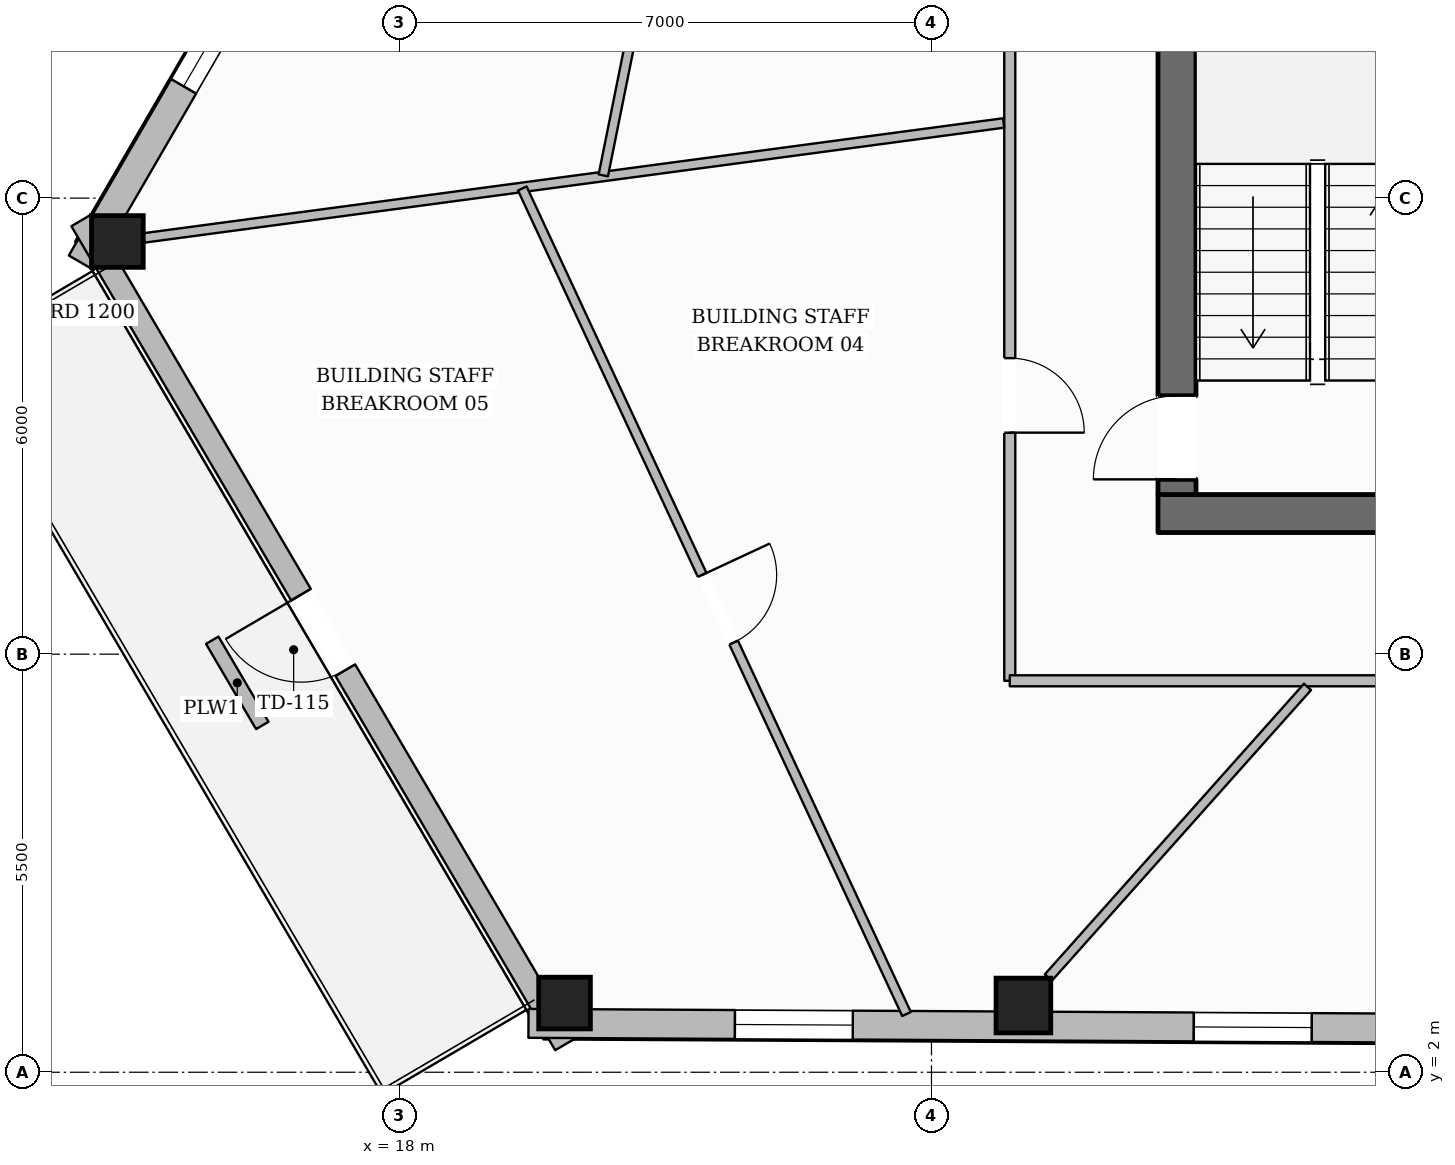
"""IFC4 building model, lengths in metres.
Left out: names, types, materials, properties, quantities, classifications, styles, units other than length and angle.
Written with IfcOpenShell. Run it as: python <this file> out.ifc"""

import sys

from ifc_helpers import new_model, si_unit, direction, frame, frame_2d, origin, origin_2d, place, context, subcontext, project, spatial, rectangle, hollow_rectangle, extrude, element, fill, save


model = new_model("IFC4")
c1 = context("Model", 3, precision=1e-05, world=origin(), true_north=direction((0.0, 1.0)))
c2 = subcontext(c1, "Body", "Model", "MODEL_VIEW")
j1 = project(units=[si_unit("LENGTHUNIT", "METRE"), si_unit("PLANEANGLEUNIT", "RADIAN")], contexts=[c1])
p1 = place(None, origin())
s1 = spatial("IfcSite", under=j1, at=p1, CompositionType="ELEMENT")
p2 = place(p1, origin())
s2 = spatial("IfcBuilding", under=s1, at=p2, CompositionType="ELEMENT")
p3 = place(p2, frame((0.0, 0.0, 124.0)))
s3 = spatial("IfcBuildingStorey", under=s2, at=p3, CompositionType="ELEMENT", Elevation=124.0)
p4 = place(p3, frame((27.98, 9.35, 0.0), z_axis=(0.0, 0.0, 1.0), x_axis=(1.0, 0.0, 0.0)))
e1 = element("IfcWall", 1, at=p4, inside=s3, PredefinedType="SOLIDWALL", context=c2, shape_type="SweptSolid", body=[
    extrude(rectangle(XDim=20.04, YDim=0.5, at=frame_2d((10.02, 0.0))), origin(), (0.0, 0.0, 1.0), 3.6),
])
p5 = place(p4, frame((10.52, 0.0, 0.0)))
e2 = element("IfcOpeningElement", 2, at=p5, cuts=e1, PredefinedType="OPENING", context=c2, shape_type="SweptSolid", body=[
    extrude(rectangle(XDim=1.4, YDim=2.2, at=frame_2d((0.7, 1.1))), frame((0.0, 0.26, 0.0), z_axis=(0.0, -1.0, 0.0), x_axis=(1.0, 0.0, 0.0)), (0.0, 0.0, 1.0), 0.52),
])
p6 = place(p3, frame((28.23, 9.6, 0.0), z_axis=(0.0, 0.0, 1.0), x_axis=(0.0, 1.0, 0.0)))
e3 = element("IfcWall", 3, at=p6, inside=s3, PredefinedType="SOLIDWALL", context=c2, shape_type="SweptSolid", body=[
    extrude(rectangle(XDim=13.0, YDim=0.5, at=frame_2d((6.5, 0.0))), origin(), (0.0, 0.0, 1.0), 3.6),
])
p7 = place(p6, frame((0.2, 0.0, 0.0)))
e4 = element("IfcOpeningElement", 4, at=p7, cuts=e3, PredefinedType="OPENING", context=c2, shape_type="SweptSolid", body=[
    extrude(rectangle(XDim=1.1, YDim=2.15, at=frame_2d((0.55, 1.075))), frame((0.0, 0.26, 0.0), z_axis=(0.0, -1.0, 0.0), x_axis=(1.0, 0.0, 0.0)), (0.0, 0.0, 1.0), 0.52),
])
p8 = place(p6, frame((8.4, 0.0, 0.0)))
e5 = element("IfcOpeningElement", 5, at=p8, cuts=e3, PredefinedType="OPENING", context=c2, shape_type="SweptSolid", body=[
    extrude(rectangle(XDim=0.9, YDim=2.1, at=frame_2d((0.45, 1.05))), frame((0.0, 0.26, 0.0), z_axis=(0.0, -1.0, 0.0), x_axis=(1.0, 0.0, 0.0)), (0.0, 0.0, 1.0), 0.52),
])
for number, where, z_axis, x_axis in (
    (6, (14.29, 12.929, 0.0), (0.0, 0.0, 1.0), (1.0, 0.0, 0.0)),
    (7, (20.173, 2.91, 0.0), (0.0, 0.0, 1.0), (1.0, 0.0, 0.0)),
):
    element("IfcColumn", number, at=place(p3, frame(where, z_axis=z_axis, x_axis=x_axis)), inside=s3, PredefinedType="COLUMN", context=c2, shape_type="SweptSolid", body=[
        extrude(hollow_rectangle(XDim=0.68, YDim=0.68, WallThickness=0.03, at=origin_2d()), origin(), (0.0, 0.0, 1.0), 3.6),
    ])
p9 = place(p3, frame((26.209, 2.878, 0.0), z_axis=(0.0, 0.0, 1.0), x_axis=(1.0, 0.0, 0.0)))
e8 = element("IfcColumn", 8, at=p9, inside=s3, PredefinedType="COLUMN", context=c2, shape_type="SweptSolid", body=[
    extrude(hollow_rectangle(XDim=0.72, YDim=0.72, WallThickness=0.032, at=origin_2d()), origin(), (0.0, 0.0, 1.0), 3.6),
])
p10 = place(p3, frame((13.815, 12.649, 0.0), z_axis=(0.0, 0.0, 1.0), x_axis=(0.501718288841, 0.865031073801, 0.0)))
e9 = element("IfcWall", 9, at=p10, inside=s3, PredefinedType="STANDARD", context=c2, shape_type="SweptSolid", body=[
    extrude(rectangle(XDim=36.708, YDim=0.38, at=frame_2d((18.354, 0.0))), origin(), (0.0, 0.0, 1.0), 3.059),
])
p11 = place(p10, frame((32.476, 0.0, 0.65)))
e10 = element("IfcOpeningElement", 10, at=p11, cuts=e9, PredefinedType="OPENING", context=c2, shape_type="SweptSolid", body=[
    extrude(rectangle(XDim=1.55, YDim=1.75, at=frame_2d((0.775, 0.875))), frame((0.0, 0.2, 0.0), z_axis=(0.0, -1.0, 0.0), x_axis=(1.0, 0.0, 0.0)), (0.0, 0.0, 1.0), 0.4),
])
p12 = place(p10, frame((26.517, 0.0, 0.65)))
e11 = element("IfcOpeningElement", 11, at=p12, cuts=e9, PredefinedType="OPENING", context=c2, shape_type="SweptSolid", body=[
    extrude(rectangle(XDim=1.55, YDim=1.75, at=frame_2d((0.775, 0.875))), frame((0.0, 0.2, 0.0), z_axis=(0.0, -1.0, 0.0), x_axis=(1.0, 0.0, 0.0)), (0.0, 0.0, 1.0), 0.4),
])
p13 = place(p10, frame((14.601, 0.0, 0.65)))
e12 = element("IfcOpeningElement", 12, at=p13, cuts=e9, PredefinedType="OPENING", context=c2, shape_type="SweptSolid", body=[
    extrude(rectangle(XDim=1.55, YDim=1.75, at=frame_2d((0.775, 0.875))), frame((0.0, 0.2, 0.0), z_axis=(0.0, -1.0, 0.0), x_axis=(1.0, 0.0, 0.0)), (0.0, 0.0, 1.0), 0.4),
])
p14 = place(p10, frame((8.643, 0.0, 0.65)))
e13 = element("IfcOpeningElement", 13, at=p14, cuts=e9, PredefinedType="OPENING", context=c2, shape_type="SweptSolid", body=[
    extrude(rectangle(XDim=1.55, YDim=1.75, at=frame_2d((0.775, 0.875))), frame((0.0, 0.2, 0.0), z_axis=(0.0, -1.0, 0.0), x_axis=(1.0, 0.0, 0.0)), (0.0, 0.0, 1.0), 0.4),
])
p15 = place(p10, frame((2.684, 0.0, 0.65)))
e14 = element("IfcOpeningElement", 14, at=p15, cuts=e9, PredefinedType="OPENING", context=c2, shape_type="SweptSolid", body=[
    extrude(rectangle(XDim=1.55, YDim=1.75, at=frame_2d((0.775, 0.875))), frame((0.0, 0.2, 0.0), z_axis=(0.0, -1.0, 0.0), x_axis=(1.0, 0.0, 0.0)), (0.0, 0.0, 1.0), 0.4),
])
p16 = place(p3, frame((20.179, 2.366, 0.0), z_axis=(0.0, 0.0, 1.0), x_axis=(-0.506333382152, 0.862337814385, 0.0)))
e15 = element("IfcWall", 15, at=p16, inside=s3, PredefinedType="STANDARD", context=c2, shape_type="SweptSolid", body=[
    extrude(rectangle(XDim=12.572, YDim=0.3, at=frame_2d((6.286, 0.0))), origin(), (0.0, 0.0, 1.0), 3.059),
])
p17 = place(p16, frame((5.711, 0.0, 0.0)))
e16 = element("IfcOpeningElement", 16, at=p17, cuts=e15, PredefinedType="OPENING", context=c2, shape_type="SweptSolid", body=[
    extrude(rectangle(XDim=1.15, YDim=2.2, at=frame_2d((0.575, 1.1))), frame((0.0, 0.16, 0.0), z_axis=(0.0, -1.0, 0.0), x_axis=(1.0, 0.0, 0.0)), (0.0, 0.0, 1.0), 0.32),
])
p18 = place(p3, frame((56.871, 2.444, 0.0), z_axis=(0.0, 0.0, 1.0), x_axis=(-0.999985675059, 0.00535253921, 0.0)))
e17 = element("IfcWall", 17, at=p18, inside=s3, PredefinedType="STANDARD", context=c2, shape_type="SweptSolid", body=[
    extrude(rectangle(XDim=37.174, YDim=0.38, at=frame_2d((18.587, 0.0))), origin(), (0.0, 0.0, 1.0), 3.059),
])
p19 = place(p18, frame((32.907, 0.0, 0.65)))
e18 = element("IfcOpeningElement", 18, at=p19, cuts=e17, PredefinedType="OPENING", context=c2, shape_type="SweptSolid", body=[
    extrude(rectangle(XDim=1.55, YDim=1.75, at=frame_2d((0.775, 0.875))), frame((0.0, 0.2, 0.0), z_axis=(0.0, -1.0, 0.0), x_axis=(1.0, 0.0, 0.0)), (0.0, 0.0, 1.0), 0.4),
])
p20 = place(p18, frame((26.87, 0.0, 0.65)))
e19 = element("IfcOpeningElement", 19, at=p20, cuts=e17, PredefinedType="OPENING", context=c2, shape_type="SweptSolid", body=[
    extrude(rectangle(XDim=1.55, YDim=1.75, at=frame_2d((0.775, 0.875))), frame((0.0, 0.2, 0.0), z_axis=(0.0, -1.0, 0.0), x_axis=(1.0, 0.0, 0.0)), (0.0, 0.0, 1.0), 0.4),
])
p21 = place(p18, frame((14.796, 0.0, 0.65)))
e20 = element("IfcOpeningElement", 20, at=p21, cuts=e17, PredefinedType="OPENING", context=c2, shape_type="SweptSolid", body=[
    extrude(rectangle(XDim=1.55, YDim=1.75, at=frame_2d((0.775, 0.875))), frame((0.0, 0.2, 0.0), z_axis=(0.0, -1.0, 0.0), x_axis=(1.0, 0.0, 0.0)), (0.0, 0.0, 1.0), 0.4),
])
p22 = place(p18, frame((8.759, 0.0, 0.65)))
e21 = element("IfcOpeningElement", 21, at=p22, cuts=e17, PredefinedType="OPENING", context=c2, shape_type="SweptSolid", body=[
    extrude(rectangle(XDim=1.55, YDim=1.75, at=frame_2d((0.775, 0.875))), frame((0.0, 0.2, 0.0), z_axis=(0.0, -1.0, 0.0), x_axis=(1.0, 0.0, 0.0)), (0.0, 0.0, 1.0), 0.4),
])
p23 = place(p18, frame((2.722, 0.0, 0.65)))
e22 = element("IfcOpeningElement", 22, at=p23, cuts=e17, PredefinedType="OPENING", context=c2, shape_type="SweptSolid", body=[
    extrude(rectangle(XDim=1.55, YDim=1.75, at=frame_2d((0.775, 0.875))), frame((0.0, 0.2, 0.0), z_axis=(0.0, -1.0, 0.0), x_axis=(1.0, 0.0, 0.0)), (0.0, 0.0, 1.0), 0.4),
])
p24 = place(p3, frame((15.538, 7.683, 0.0), z_axis=(0.0, 0.0, 1.0), x_axis=(0.506379735558, -0.862310595677, 0.0)))
e23 = element("IfcWall", 23, at=p24, inside=s3, PredefinedType="USERDEFINED", context=c2, shape_type="SweptSolid", body=[
    extrude(rectangle(XDim=1.3, YDim=0.19, at=frame_2d((0.65, 0.0))), origin(), (0.0, 0.0, 1.0), 0.52),
])
p25 = place(p3, frame((26.03, 25.05, 0.0), z_axis=(0.0, 0.0, 1.0), x_axis=(0.0, -1.0, 0.0)))
e24 = element("IfcWall", 24, at=p25, inside=s3, PredefinedType="PARTITIONING", context=c2, shape_type="SweptSolid", body=[
    extrude(rectangle(XDim=17.9, YDim=0.145, at=frame_2d((8.95, 0.0))), origin(), (0.0, 0.0, 1.0), 3.288),
])
p26 = place(p25, frame((4.876, 0.0, 0.0)))
e25 = element("IfcOpeningElement", 25, at=p26, cuts=e24, PredefinedType="OPENING", context=c2, shape_type="SweptSolid", body=[
    extrude(rectangle(XDim=0.98, YDim=2.15, at=frame_2d((0.49, 1.075))), frame((0.0, 0.083, 0.0), z_axis=(0.0, -1.0, 0.0), x_axis=(1.0, 0.0, 0.0)), (0.0, 0.0, 1.0), 0.165),
])
p27 = place(p25, frame((13.656, 0.0, 0.0)))
e26 = element("IfcOpeningElement", 26, at=p27, cuts=e24, PredefinedType="OPENING", context=c2, shape_type="SweptSolid", body=[
    extrude(rectangle(XDim=0.98, YDim=2.15, at=frame_2d((0.49, 1.075))), frame((0.0, 0.083, 0.0), z_axis=(0.0, -1.0, 0.0), x_axis=(1.0, 0.0, 0.0)), (0.0, 0.0, 1.0), 0.165),
])
p28 = place(p3, frame((26.03, 7.15, 0.0), z_axis=(0.0, 0.0, 1.0), x_axis=(1.0, 0.0, 0.0)))
e27 = element("IfcWall", 27, at=p28, inside=s3, PredefinedType="PARTITIONING", context=c2, shape_type="SweptSolid", body=[
    extrude(rectangle(XDim=23.94, YDim=0.145, at=frame_2d((11.97, 0.0))), origin(), (0.0, 0.0, 1.0), 3.6),
])
p29 = place(p28, frame((9.635, 0.0, 0.0)))
e28 = element("IfcOpeningElement", 28, at=p29, cuts=e27, PredefinedType="OPENING", context=c2, shape_type="SweptSolid", body=[
    extrude(rectangle(XDim=0.98, YDim=2.15, at=frame_2d((0.49, 1.075))), frame((0.0, 0.083, 0.0), z_axis=(0.0, -1.0, 0.0), x_axis=(1.0, 0.0, 0.0)), (0.0, 0.0, 1.0), 0.165),
])
p30 = place(p3, frame((25.949, 14.489, 0.0), z_axis=(0.0, 0.0, 1.0), x_axis=(-0.991176633898, -0.132547653371, 0.0)))
e29 = element("IfcWall", 29, at=p30, inside=s3, PredefinedType="PARTITIONING", context=c2, shape_type="SweptSolid", body=[
    extrude(rectangle(XDim=11.412, YDim=0.125, at=frame_2d((5.706, 0.0))), origin(), (0.0, 0.0, 1.0), 3.141),
])
p31 = place(p3, frame((29.947, 7.07, 0.0), z_axis=(0.0, 0.0, 1.0), x_axis=(-0.665563912799, -0.746340859111, 0.0)))
e30 = element("IfcWall", 30, at=p31, inside=s3, PredefinedType="PARTITIONING", context=c2, shape_type="SweptSolid", body=[
    extrude(rectangle(XDim=5.123, YDim=0.125, at=frame_2d((2.562, 0.0))), origin(), (0.0, 0.0, 1.0), 3.6),
])
p32 = place(p3, frame((23.548, 28.024, 0.0), z_axis=(0.0, 0.0, 1.0), x_axis=(-0.197497571842, -0.980303376061, 0.0)))
e31 = element("IfcWall", 31, at=p32, inside=s3, PredefinedType="PARTITIONING", context=c2, shape_type="SweptSolid", body=[
    extrude(rectangle(XDim=14.51, YDim=0.125, at=frame_2d((7.255, 0.0))), origin(), (0.0, 0.0, 1.0), 3.288),
])
p33 = place(p32, frame((6.727, 0.0, 0.0)))
e32 = element("IfcOpeningElement", 32, at=p33, cuts=e31, PredefinedType="OPENING", context=c2, shape_type="SweptSolid", body=[
    extrude(rectangle(XDim=0.98, YDim=2.15, at=frame_2d((0.49, 1.075))), frame((0.0, 0.073, 0.0), z_axis=(0.0, -1.0, 0.0), x_axis=(1.0, 0.0, 0.0)), (0.0, 0.0, 1.0), 0.145),
])
p34 = place(p3, frame((19.617, 13.627, 0.0), z_axis=(0.0, 0.0, 1.0), x_axis=(0.421978172628, -0.906605990398, 0.0)))
e33 = element("IfcWall", 33, at=p34, inside=s3, PredefinedType="PARTITIONING", context=c2, shape_type="SweptSolid", body=[
    extrude(rectangle(XDim=11.979, YDim=0.125, at=frame_2d((5.99, 0.0))), origin(), (0.0, 0.0, 1.0), 3.6),
])
p35 = place(p34, frame((5.608, 0.0, 0.0)))
e34 = element("IfcOpeningElement", 34, at=p35, cuts=e33, PredefinedType="OPENING", context=c2, shape_type="SweptSolid", body=[
    extrude(rectangle(XDim=0.98, YDim=2.15, at=frame_2d((0.49, 1.075))), frame((0.0, 0.073, 0.0), z_axis=(0.0, -1.0, 0.0), x_axis=(1.0, 0.0, 0.0)), (0.0, 0.0, 1.0), 0.145),
])
p36 = place(p17, origin())
e35 = element("IfcDoor", 35, at=p36, inside=s3, OperationType="SINGLE_SWING_RIGHT", PredefinedType="DOOR", context=c2, shape_type="SweptSolid", body=[
    extrude(rectangle(XDim=1.15, YDim=2.2, at=frame_2d((0.575, 1.1))), frame((0.0, 0.025, 0.0), z_axis=(0.0, -1.0, 0.0), x_axis=(1.0, 0.0, 0.0)), (0.0, 0.0, 1.0), 0.05),
])
fill(e16, e35)
p37 = place(p15, origin())
e36 = element("IfcWindow", 36, at=p37, inside=s3, PartitioningType="SINGLE_PANEL", PredefinedType="WINDOW", context=c2, shape_type="SweptSolid", body=[
    extrude(rectangle(XDim=1.55, YDim=1.75, at=frame_2d((0.775, 0.875))), frame((0.0, 0.03, 0.0), z_axis=(0.0, -1.0, 0.0), x_axis=(1.0, 0.0, 0.0)), (0.0, 0.0, 1.0), 0.06),
])
fill(e14, e36)
p38 = place(p19, origin())
e37 = element("IfcWindow", 37, at=p38, inside=s3, PartitioningType="SINGLE_PANEL", PredefinedType="WINDOW", context=c2, shape_type="SweptSolid", body=[
    extrude(rectangle(XDim=1.55, YDim=1.75, at=frame_2d((0.775, 0.875))), frame((0.0, 0.03, 0.0), z_axis=(0.0, -1.0, 0.0), x_axis=(1.0, 0.0, 0.0)), (0.0, 0.0, 1.0), 0.06),
])
fill(e18, e37)
p39 = place(p20, origin())
e38 = element("IfcWindow", 38, at=p39, inside=s3, PartitioningType="SINGLE_PANEL", PredefinedType="WINDOW", context=c2, shape_type="SweptSolid", body=[
    extrude(rectangle(XDim=1.55, YDim=1.75, at=frame_2d((0.775, 0.875))), frame((0.0, 0.03, 0.0), z_axis=(0.0, -1.0, 0.0), x_axis=(1.0, 0.0, 0.0)), (0.0, 0.0, 1.0), 0.06),
])
fill(e19, e38)
p40 = place(p7, origin())
e39 = element("IfcDoor", 39, at=p40, inside=s3, OperationType="SINGLE_SWING_LEFT", PredefinedType="DOOR", context=c2, shape_type="SweptSolid", body=[
    extrude(rectangle(XDim=1.1, YDim=2.15, at=frame_2d((0.55, 1.075))), frame((0.0, 0.025, 0.0), z_axis=(0.0, -1.0, 0.0), x_axis=(1.0, 0.0, 0.0)), (0.0, 0.0, 1.0), 0.05),
])
fill(e4, e39)
p41 = place(p27, origin())
e40 = element("IfcDoor", 40, at=p41, inside=s3, OperationType="SINGLE_SWING_RIGHT", PredefinedType="DOOR", context=c2, shape_type="SweptSolid", body=[
    extrude(rectangle(XDim=0.98, YDim=2.15, at=frame_2d((0.49, 1.075))), frame((0.0, 0.025, 0.0), z_axis=(0.0, -1.0, 0.0), x_axis=(1.0, 0.0, 0.0)), (0.0, 0.0, 1.0), 0.05),
])
fill(e26, e40)
p42 = place(p35, origin())
e41 = element("IfcDoor", 41, at=p42, inside=s3, OperationType="SINGLE_SWING_LEFT", PredefinedType="DOOR", context=c2, shape_type="SweptSolid", body=[
    extrude(rectangle(XDim=0.98, YDim=2.15, at=frame_2d((0.49, 1.075))), frame((0.0, 0.025, 0.0), z_axis=(0.0, -1.0, 0.0), x_axis=(1.0, 0.0, 0.0)), (0.0, 0.0, 1.0), 0.05),
])
fill(e34, e41)
save(model, sys.argv[1])
